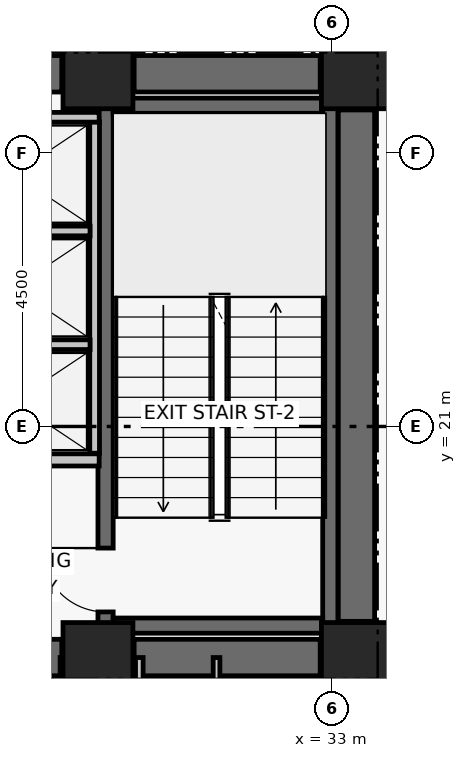
"""IFC4 building model, lengths in metres.
Left out: names, types, materials, properties, quantities, classifications, styles, units other than length and angle.
Written with IfcOpenShell. Run it as: python <this file> out.ifc"""

import sys

from ifc_helpers import new_model, si_unit, direction, frame, frame_2d, origin, origin_2d, place, context, subcontext, project, spatial, rectangle, extrude, element, fill, save


model = new_model("IFC4")
c1 = context("Model", 3, precision=1e-05, world=origin(), true_north=direction((0.0, 1.0)))
c2 = subcontext(c1, "Body", "Model", "MODEL_VIEW")
j1 = project(units=[si_unit("LENGTHUNIT", "METRE"), si_unit("PLANEANGLEUNIT", "RADIAN")], contexts=[c1])
p1 = place(None, origin())
s1 = spatial("IfcSite", under=j1, at=p1, CompositionType="ELEMENT")
p2 = place(p1, origin())
s2 = spatial("IfcBuilding", under=s1, at=p2, CompositionType="ELEMENT")
p3 = place(p2, frame((0.0, 0.0, 57.36)))
s3 = spatial("IfcBuildingStorey", under=s2, at=p3, CompositionType="ELEMENT", Elevation=57.36)
for number, where, z_axis, x_axis in (
    (1, (29.15, 17.2, 0.0), (0.0, 0.0, 1.0), (1.0, 0.0, 0.0)),
    (2, (33.4, 17.2, 0.0), (0.0, 0.0, 1.0), (1.0, 0.0, 0.0)),
    (3, (29.15, 26.8, 0.0), (0.0, 0.0, 1.0), (1.0, 0.0, 0.0)),
    (4, (33.4, 26.8, 0.0), (0.0, 0.0, 1.0), (1.0, 0.0, 0.0)),
):
    element("IfcColumn", number, at=place(p3, frame(where, z_axis=z_axis, x_axis=x_axis)), inside=s3, PredefinedType="COLUMN", context=c2, shape_type="SweptSolid", body=[
        extrude(rectangle(XDim=1.15, YDim=1.15, at=origin_2d()), origin(), (0.0, 0.0, 1.0), 3.72),
    ])
p4 = place(p3, frame((26.85, 17.2, 0.0), z_axis=(0.0, 0.0, 1.0), x_axis=(1.0, 0.0, 0.0)))
e5 = element("IfcWall", 5, at=p4, inside=s3, PredefinedType="SHEAR", context=c2, shape_type="SweptSolid", body=[
    extrude(rectangle(XDim=1.705, YDim=0.6, at=frame_2d((0.853, 0.0))), origin(), (0.0, 0.0, 1.0), 3.47),
])
p5 = place(p3, frame((29.745, 17.2, 0.0), z_axis=(0.0, 0.0, 1.0), x_axis=(1.0, 0.0, 0.0)))
e6 = element("IfcWall", 6, at=p5, inside=s3, PredefinedType="SHEAR", context=c2, shape_type="SweptSolid", body=[
    extrude(rectangle(XDim=3.06, YDim=0.6, at=frame_2d((1.53, 0.0))), origin(), (0.0, 0.0, 1.0), 3.47),
])
p6 = place(p3, frame((26.85, 26.8, 0.0), z_axis=(0.0, 0.0, 1.0), x_axis=(1.0, 0.0, 0.0)))
e7 = element("IfcWall", 7, at=p6, inside=s3, PredefinedType="SHEAR", context=c2, shape_type="SweptSolid", body=[
    extrude(rectangle(XDim=1.705, YDim=0.6, at=frame_2d((0.853, 0.0))), origin(), (0.0, 0.0, 1.0), 3.47),
])
p7 = place(p3, frame((29.745, 26.8, 0.0), z_axis=(0.0, 0.0, 1.0), x_axis=(1.0, 0.0, 0.0)))
e8 = element("IfcWall", 8, at=p7, inside=s3, PredefinedType="SHEAR", context=c2, shape_type="SweptSolid", body=[
    extrude(rectangle(XDim=3.06, YDim=0.6, at=frame_2d((1.53, 0.0))), origin(), (0.0, 0.0, 1.0), 3.47),
])
p8 = place(p3, frame((33.4, 17.795, 0.0), z_axis=(0.0, 0.0, 1.0), x_axis=(0.0, 1.0, 0.0)))
e9 = element("IfcWall", 9, at=p8, inside=s3, PredefinedType="SHEAR", context=c2, shape_type="SweptSolid", body=[
    extrude(rectangle(XDim=8.41, YDim=0.6, at=frame_2d((4.205, 0.0))), origin(), (0.0, 0.0, 1.0), 3.47),
])
p9 = place(p3, frame((29.275, 17.6, 0.0), z_axis=(0.0, 0.0, 1.0), x_axis=(0.0, 1.0, 0.0)))
e10 = element("IfcWall", 10, at=p9, inside=s3, PredefinedType="SHEAR", context=c2, shape_type="SweptSolid", body=[
    extrude(rectangle(XDim=8.8, YDim=0.25, at=frame_2d((4.4, 0.0))), origin(), (0.0, 0.0, 1.0), 3.47),
])
p10 = place(p9, frame((0.35, 0.0, 0.0)))
e11 = element("IfcOpeningElement", 11, at=p10, cuts=e10, PredefinedType="OPENING", context=c2, shape_type="SweptSolid", body=[
    extrude(rectangle(XDim=1.05, YDim=2.08, at=frame_2d((0.525, 1.04))), frame((0.0, 0.135, 0.0), z_axis=(0.0, -1.0, 0.0), x_axis=(1.0, 0.0, 0.0)), (0.0, 0.0, 1.0), 0.27),
])
p11 = place(p3, frame((32.971, 17.6, 0.0), z_axis=(0.0, 0.0, 1.0), x_axis=(0.0, 1.0, 0.0)))
e12 = element("IfcWall", 12, at=p11, inside=s3, PredefinedType="SHEAR", context=c2, shape_type="SweptSolid", body=[
    extrude(rectangle(XDim=8.8, YDim=0.25, at=frame_2d((4.4, 0.0))), origin(), (0.0, 0.0, 1.0), 3.47),
])
for number, where, z_axis, x_axis in (
    (13, (29.4, 17.725, 0.0), (0.0, 0.0, 1.0), (1.0, 0.0, 0.0)),
    (14, (29.4, 26.275, 0.0), (0.0, 0.0, 1.0), (1.0, 0.0, 0.0)),
):
    element("IfcWall", number, at=place(p3, frame(where, z_axis=z_axis, x_axis=x_axis)), inside=s3, PredefinedType="SHEAR", context=c2, shape_type="SweptSolid", body=[
        extrude(rectangle(XDim=3.446, YDim=0.25, at=frame_2d((1.723, 0.0))), origin(), (0.0, 0.0, 1.0), 3.47),
    ])
p12 = place(p3, frame((26.37, 20.45, 0.0), z_axis=(0.0, 0.0, 1.0), x_axis=(1.0, 0.0, 0.0)))
e15 = element("IfcWall", 15, at=p12, inside=s3, PredefinedType="PARTITIONING", context=c2, shape_type="SweptSolid", body=[
    extrude(rectangle(XDim=2.8, YDim=0.2, at=frame_2d((1.4, 0.0))), origin(), (0.0, 0.0, 1.0), 3.47),
])
p13 = place(p12, frame((0.78, 0.0, 0.0)))
e16 = element("IfcOpeningElement", 16, at=p13, cuts=e15, PredefinedType="OPENING", context=c2, shape_type="SweptSolid", body=[
    extrude(rectangle(XDim=1.1, YDim=2.08, at=frame_2d((0.55, 1.04))), frame((0.0, 0.11, 0.0), z_axis=(0.0, -1.0, 0.0), x_axis=(1.0, 0.0, 0.0)), (0.0, 0.0, 1.0), 0.22),
])
p14 = place(p3, frame((29.095, 20.56, 0.0), z_axis=(0.0, 0.0, 1.0), x_axis=(0.0, 1.0, 0.0)))
e17 = element("IfcWall", 17, at=p14, inside=s3, PredefinedType="PARTITIONING", context=c2, shape_type="SweptSolid", body=[
    extrude(rectangle(XDim=5.45, YDim=0.16, at=frame_2d((2.725, 0.0))), origin(), (0.0, 0.0, 1.0), 3.47),
])
p15 = place(p3, frame((26.37, 22.345, 0.0), z_axis=(0.0, 0.0, 1.0), x_axis=(1.0, 0.0, 0.0)))
e18 = element("IfcWall", 18, at=p15, inside=s3, PredefinedType="PARTITIONING", context=c2, shape_type="SweptSolid", body=[
    extrude(rectangle(XDim=2.65, YDim=0.16, at=frame_2d((1.325, 0.0))), origin(), (0.0, 0.0, 1.0), 3.47),
])
p16 = place(p3, frame((26.53, 24.215, 0.0), z_axis=(0.0, 0.0, 1.0), x_axis=(1.0, 0.0, 0.0)))
e19 = element("IfcWall", 19, at=p16, inside=s3, PredefinedType="PARTITIONING", context=c2, shape_type="SweptSolid", body=[
    extrude(rectangle(XDim=2.49, YDim=0.16, at=frame_2d((1.245, 0.0))), origin(), (0.0, 0.0, 1.0), 3.47),
])
p17 = place(p3, frame((26.34, 26.085, 0.0), z_axis=(0.0, 0.0, 1.0), x_axis=(1.0, 0.0, 0.0)))
e20 = element("IfcWall", 20, at=p17, inside=s3, PredefinedType="PARTITIONING", context=c2, shape_type="SweptSolid", body=[
    extrude(rectangle(XDim=2.83, YDim=0.16, at=frame_2d((1.415, 0.0))), origin(), (0.0, 0.0, 1.0), 3.47),
])
for number, where, z_axis, x_axis in (
    (21, (28.59, 14.95, 0.0), (0.0, 0.0, 1.0), (0.0, 1.0, 0.0)),
    (22, (29.83, 14.95, 0.0), (0.0, 0.0, 1.0), (0.0, 1.0, 0.0)),
):
    element("IfcWall", number, at=place(p3, frame(where, z_axis=z_axis, x_axis=x_axis)), inside=s3, PredefinedType="PARTITIONING", context=c2, shape_type="SweptSolid", body=[
        extrude(rectangle(XDim=2.25, YDim=0.125, at=frame_2d((1.125, 0.0))), origin(), (0.0, 0.0, 1.0), 2.6),
    ])
p18 = place(p3, frame((31.1, 14.95, 0.0), z_axis=(0.0, 0.0, 1.0), x_axis=(0.0, 1.0, 0.0)))
e23 = element("IfcWall", 23, at=p18, inside=s3, PredefinedType="PARTITIONING", context=c2, shape_type="SweptSolid", body=[
    extrude(rectangle(XDim=2.25, YDim=0.11, at=frame_2d((1.125, 0.0))), origin(), (0.0, 0.0, 1.0), 2.6),
])
p19 = place(p3, frame((33.74, 27.22, 0.0), z_axis=(0.0, 0.0, 1.0), x_axis=(-1.0, 0.0, 0.0)))
e24 = element("IfcWall", 24, at=p19, inside=s3, PredefinedType="PARTITIONING", context=c2, shape_type="SweptSolid", body=[
    extrude(rectangle(XDim=0.86, YDim=0.145, at=frame_2d((0.43, 0.0))), origin(), (0.0, 0.0, 1.0), 2.6),
])
p20 = place(p10, origin())
e25 = element("IfcDoor", 25, at=p20, inside=s3, OperationType="SINGLE_SWING_RIGHT", PredefinedType="DOOR", context=c2, shape_type="SweptSolid", body=[
    extrude(rectangle(XDim=1.05, YDim=2.08, at=frame_2d((0.525, 1.04))), frame((0.0, 0.025, 0.0), z_axis=(0.0, -1.0, 0.0), x_axis=(1.0, 0.0, 0.0)), (0.0, 0.0, 1.0), 0.05),
])
fill(e11, e25)
save(model, sys.argv[1])
